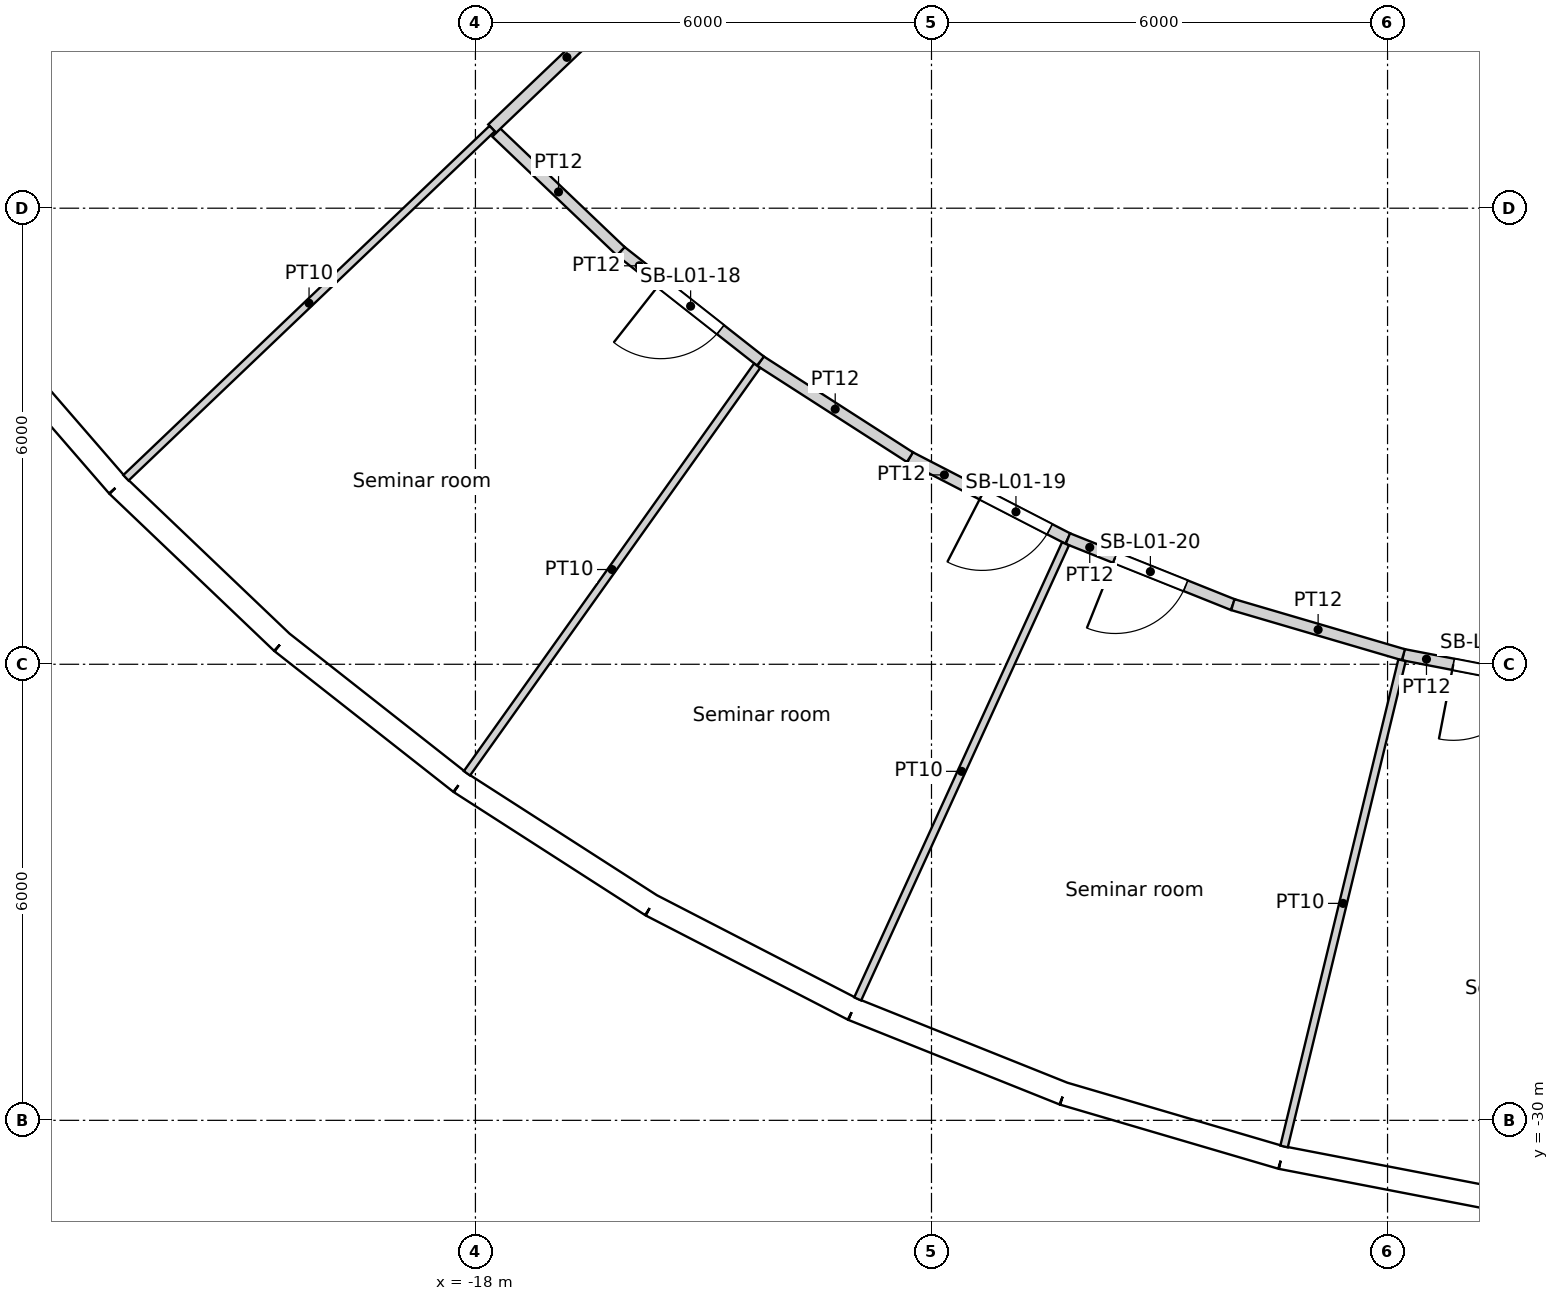
"""IFC4 building model, lengths in metres.
Left out: names, types, materials, properties, quantities, classifications, styles, units other than length and angle.
Written with IfcOpenShell. Run it as: python <this file> out.ifc"""

import sys

from ifc_helpers import new_model, si_unit, direction, frame, frame_2d, origin, origin_2d, place, context, subcontext, project, spatial, rectangle, circle, extrude, element, fill, save


model = new_model("IFC4")
c1 = context("Model", 3, precision=1e-05, world=origin(), true_north=direction((0.0, 1.0)))
c2 = subcontext(c1, "Body", "Model", "MODEL_VIEW")
j1 = project(units=[si_unit("LENGTHUNIT", "METRE"), si_unit("PLANEANGLEUNIT", "RADIAN")], contexts=[c1])
p1 = place(None, origin())
s1 = spatial("IfcSite", under=j1, at=p1, CompositionType="ELEMENT")
p2 = place(p1, origin())
s2 = spatial("IfcBuilding", under=s1, at=p2, CompositionType="ELEMENT")
p3 = place(p2, frame((0.0, 0.0, 9.0)))
s3 = spatial("IfcBuildingStorey", under=s2, at=p3, CompositionType="ELEMENT", Elevation=9.0)
for number, where, z_axis, x_axis in (
    (1, (-23.797, -18.715, 0.0), (0.0, 0.0, 1.0), (1.0, 0.0, 0.0)),
    (2, (-19.826, -22.88, 0.0), (0.0, 0.0, 1.0), (1.0, 0.0, 0.0)),
    (3, (-15.137, -26.219, 0.0), (0.0, 0.0, 1.0), (1.0, 0.0, 0.0)),
    (4, (-9.902, -28.61, 0.0), (0.0, 0.0, 1.0), (1.0, 0.0, 0.0)),
    (5, (-4.309, -29.966, 0.0), (0.0, 0.0, 1.0), (1.0, 0.0, 0.0)),
):
    element("IfcColumn", number, at=place(p3, frame(where, z_axis=z_axis, x_axis=x_axis)), inside=s3, PredefinedType="COLUMN", context=c2, shape_type="SweptSolid", body=[
        extrude(circle(Radius=0.7, at=origin_2d()), origin(), (0.0, 0.0, 1.0), 4.8),
    ])
for number, where, z_axis, x_axis in (
    (6, (-16.846, -17.855, 0.0), (0.0, 0.0, 1.0), (1.0, 0.0, 0.0)),
    (7, (-12.274, -21.259, 0.0), (0.0, 0.0, 1.0), (1.0, 0.0, 0.0)),
    (8, (-7.04, -23.516, 0.0), (0.0, 0.0, 1.0), (1.0, 0.0, 0.0)),
):
    element("IfcColumn", number, at=place(p3, frame(where, z_axis=z_axis, x_axis=x_axis)), inside=s3, PredefinedType="COLUMN", context=c2, shape_type="SweptSolid", body=[
        extrude(circle(Radius=0.75, at=origin_2d()), origin(), (0.0, 0.0, 1.0), 4.8),
    ])
for number, where, z_axis, x_axis in (
    (9, (-9.411, -16.301, 0.0), (0.0, 0.0, 1.0), (1.0, 0.0, 0.0)),
    (10, (-4.188, -18.35, 0.0), (0.0, 0.0, 1.0), (1.0, 0.0, 0.0)),
):
    element("IfcColumn", number, at=place(p3, frame(where, z_axis=z_axis, x_axis=x_axis)), inside=s3, PredefinedType="COLUMN", context=c2, shape_type="SweptSolid", body=[
        extrude(circle(Radius=0.8, at=origin_2d()), origin(), (0.0, 0.0, 1.0), 4.8),
    ])
p4 = place(p3, frame((-24.662, -19.394, 0.0), z_axis=(0.0, 0.0, 1.0), x_axis=(0.654809121128, -0.755794294029, 0.0)))
e11 = element("IfcWall", 11, at=p4, inside=s3, PredefinedType="SOLIDWALL", context=c2, shape_type="SweptSolid", body=[
    extrude(rectangle(XDim=2.986, YDim=0.3, at=frame_2d((1.493, 0.0))), origin(), (0.0, 0.0, 1.0), 4.35),
])
p5 = place(p4, frame((1.493, 0.0, 2.0)))
e12 = element("IfcOpeningElement", 12, at=p5, cuts=e11, PredefinedType="OPENING", context=c2, shape_type="SweptSolid", body=[
    extrude(circle(Radius=1.2, at=origin_2d()), frame((0.0, 0.16, 0.0), z_axis=(0.0, -1.0, 0.0), x_axis=(1.0, 0.0, 0.0)), (0.0, 0.0, 1.0), 0.32),
])
p6 = place(p3, frame((-22.707, -21.651, 0.0), z_axis=(0.0, 0.0, 1.0), x_axis=(0.723750841228, -0.690061388444, 0.0)))
e13 = element("IfcWall", 13, at=p6, inside=s3, PredefinedType="SOLIDWALL", context=c2, shape_type="SweptSolid", body=[
    extrude(rectangle(XDim=2.986, YDim=0.3, at=frame_2d((1.493, 0.0))), origin(), (0.0, 0.0, 1.0), 4.35),
])
p7 = place(p6, frame((1.493, 0.0, 2.0)))
e14 = element("IfcOpeningElement", 14, at=p7, cuts=e13, PredefinedType="OPENING", context=c2, shape_type="SweptSolid", body=[
    extrude(circle(Radius=1.2, at=origin_2d()), frame((0.0, 0.16, 0.0), z_axis=(0.0, -1.0, 0.0), x_axis=(1.0, 0.0, 0.0)), (0.0, 0.0, 1.0), 0.32),
])
p8 = place(p3, frame((-20.546, -23.711, 0.0), z_axis=(0.0, 0.0, 1.0), x_axis=(0.786043032847, -0.618171780747, 0.0)))
e15 = element("IfcWall", 15, at=p8, inside=s3, PredefinedType="SOLIDWALL", context=c2, shape_type="SweptSolid", body=[
    extrude(rectangle(XDim=2.986, YDim=0.3, at=frame_2d((1.493, 0.0))), origin(), (0.0, 0.0, 1.0), 4.35),
])
p9 = place(p8, frame((1.493, 0.0, 2.0)))
e16 = element("IfcOpeningElement", 16, at=p9, cuts=e15, PredefinedType="OPENING", context=c2, shape_type="SweptSolid", body=[
    extrude(circle(Radius=1.2, at=origin_2d()), frame((0.0, 0.16, 0.0), z_axis=(0.0, -1.0, 0.0), x_axis=(1.0, 0.0, 0.0)), (0.0, 0.0, 1.0), 0.32),
])
p10 = place(p3, frame((-18.199, -25.557, 0.0), z_axis=(0.0, 0.0, 1.0), x_axis=(0.841242231846, -0.540658401727, 0.0)))
e17 = element("IfcWall", 17, at=p10, inside=s3, PredefinedType="SOLIDWALL", context=c2, shape_type="SweptSolid", body=[
    extrude(rectangle(XDim=2.986, YDim=0.3, at=frame_2d((1.493, 0.0))), origin(), (0.0, 0.0, 1.0), 4.35),
])
p11 = place(p10, frame((1.493, 0.0, 2.0)))
e18 = element("IfcOpeningElement", 18, at=p11, cuts=e17, PredefinedType="OPENING", context=c2, shape_type="SweptSolid", body=[
    extrude(circle(Radius=1.2, at=origin_2d()), frame((0.0, 0.16, 0.0), z_axis=(0.0, -1.0, 0.0), x_axis=(1.0, 0.0, 0.0)), (0.0, 0.0, 1.0), 0.32),
])
p12 = place(p3, frame((-15.687, -27.171, 0.0), z_axis=(0.0, 0.0, 1.0), x_axis=(0.888831268481, -0.458234630043, 0.0)))
e19 = element("IfcWall", 19, at=p12, inside=s3, PredefinedType="SOLIDWALL", context=c2, shape_type="SweptSolid", body=[
    extrude(rectangle(XDim=2.986, YDim=0.3, at=frame_2d((1.493, 0.0))), origin(), (0.0, 0.0, 1.0), 4.35),
])
p13 = place(p12, frame((1.493, 0.0, 2.0)))
e20 = element("IfcOpeningElement", 20, at=p13, cuts=e19, PredefinedType="OPENING", context=c2, shape_type="SweptSolid", body=[
    extrude(circle(Radius=1.2, at=origin_2d()), frame((0.0, 0.16, 0.0), z_axis=(0.0, -1.0, 0.0), x_axis=(1.0, 0.0, 0.0)), (0.0, 0.0, 1.0), 0.32),
])
p14 = place(p3, frame((-13.033, -28.539, 0.0), z_axis=(0.0, 0.0, 1.0), x_axis=(0.928380795373, -0.371630325434, 0.0)))
e21 = element("IfcWall", 21, at=p14, inside=s3, PredefinedType="SOLIDWALL", context=c2, shape_type="SweptSolid", body=[
    extrude(rectangle(XDim=2.986, YDim=0.3, at=frame_2d((1.493, 0.0))), origin(), (0.0, 0.0, 1.0), 4.35),
])
p15 = place(p14, frame((1.493, 0.0, 2.0)))
e22 = element("IfcOpeningElement", 22, at=p15, cuts=e21, PredefinedType="OPENING", context=c2, shape_type="SweptSolid", body=[
    extrude(circle(Radius=1.2, at=origin_2d()), frame((0.0, 0.16, 0.0), z_axis=(0.0, -1.0, 0.0), x_axis=(1.0, 0.0, 0.0)), (0.0, 0.0, 1.0), 0.32),
])
p16 = place(p3, frame((-10.261, -29.649, 0.0), z_axis=(0.0, 0.0, 1.0), x_axis=(0.959502108153, -0.281701445593, 0.0)))
e23 = element("IfcWall", 23, at=p16, inside=s3, PredefinedType="SOLIDWALL", context=c2, shape_type="SweptSolid", body=[
    extrude(rectangle(XDim=2.986, YDim=0.3, at=frame_2d((1.493, 0.0))), origin(), (0.0, 0.0, 1.0), 4.35),
])
p17 = place(p16, frame((1.493, 0.0, 2.0)))
e24 = element("IfcOpeningElement", 24, at=p17, cuts=e23, PredefinedType="OPENING", context=c2, shape_type="SweptSolid", body=[
    extrude(circle(Radius=1.2, at=origin_2d()), frame((0.0, 0.16, 0.0), z_axis=(0.0, -1.0, 0.0), x_axis=(1.0, 0.0, 0.0)), (0.0, 0.0, 1.0), 0.32),
])
p18 = place(p3, frame((-7.397, -30.49, 0.0), z_axis=(0.0, 0.0, 1.0), x_axis=(0.981918853666, -0.189302310646, 0.0)))
e25 = element("IfcWall", 25, at=p18, inside=s3, PredefinedType="SOLIDWALL", context=c2, shape_type="SweptSolid", body=[
    extrude(rectangle(XDim=2.986, YDim=0.3, at=frame_2d((1.493, 0.0))), origin(), (0.0, 0.0, 1.0), 4.35),
])
p19 = place(p18, frame((1.493, 0.0, 2.0)))
e26 = element("IfcOpeningElement", 26, at=p19, cuts=e25, PredefinedType="OPENING", context=c2, shape_type="SweptSolid", body=[
    extrude(circle(Radius=1.2, at=origin_2d()), frame((0.0, 0.16, 0.0), z_axis=(0.0, -1.0, 0.0), x_axis=(1.0, 0.0, 0.0)), (0.0, 0.0, 1.0), 0.32),
])
p20 = place(p3, frame((-22.598, -21.547, 0.0), z_axis=(0.0, 0.0, 1.0), x_axis=(0.723738396813, 0.690074440172, 0.0)))
e27 = element("IfcWall", 27, at=p20, inside=s3, PredefinedType="PARTITIONING", context=c2, shape_type="SweptSolid", body=[
    extrude(rectangle(XDim=6.658, YDim=0.1, at=frame_2d((3.329, 0.0))), origin(), (0.0, 0.0, 1.0), 3.75),
])
p21 = place(p3, frame((-18.112, -25.435, 0.0), z_axis=(0.0, 0.0, 1.0), x_axis=(0.580055201519, 0.814577168346, 0.0)))
e28 = element("IfcWall", 28, at=p21, inside=s3, PredefinedType="PARTITIONING", context=c2, shape_type="SweptSolid", body=[
    extrude(rectangle(XDim=6.582, YDim=0.1, at=frame_2d((3.291, 0.0))), origin(), (0.0, 0.0, 1.0), 3.75),
])
p22 = place(p3, frame((-17.726, -17.005, 0.0), z_axis=(0.0, 0.0, 1.0), x_axis=(0.723737544967, -0.690075333573, 0.0)))
e29 = element("IfcWall", 29, at=p22, inside=s3, PredefinedType="PARTITIONING", context=c2, shape_type="SweptSolid", body=[
    extrude(rectangle(XDim=2.263, YDim=0.15, at=frame_2d((1.131, 0.0))), origin(), (0.0, 0.0, 1.0), 3.75),
])
p23 = place(p3, frame((-17.78, -16.953, 0.0), z_axis=(0.0, 0.0, 1.0), x_axis=(0.723749021552, 0.690063296954, 0.0)))
e30 = element("IfcWall", 30, at=p23, inside=s3, PredefinedType="PARTITIONING", context=c2, shape_type="SweptSolid", body=[
    extrude(rectangle(XDim=2.718, YDim=0.15, at=frame_2d((1.359, 0.0))), origin(), (0.0, 0.0, 1.0), 3.75),
])
p24 = place(p3, frame((-14.25, -20.011, 0.0), z_axis=(0.0, 0.0, 1.0), x_axis=(-0.786108126536, 0.618089001191, 0.0)))
e31 = element("IfcWall", 31, at=p24, inside=s3, PredefinedType="PARTITIONING", context=c2, shape_type="SweptSolid", body=[
    extrude(rectangle(XDim=2.338, YDim=0.15, at=frame_2d((1.169, 0.0))), origin(), (0.0, 0.0, 1.0), 3.75),
])
p25 = place(p24, frame((0.669, 0.0, 0.0)))
e32 = element("IfcOpeningElement", 32, at=p25, cuts=e31, PredefinedType="OPENING", context=c2, shape_type="SweptSolid", body=[
    extrude(rectangle(XDim=1.0, YDim=2.1, at=frame_2d((0.5, 1.05))), frame((0.0, 0.075, 0.0), z_axis=(0.0, -1.0, 0.0), x_axis=(1.0, 0.0, 0.0)), (0.0, 0.0, 1.0), 0.15),
])
p26 = place(p3, frame((-14.25, -20.011, 0.0), z_axis=(0.0, 0.0, 1.0), x_axis=(0.841236155743, -0.540667855777, 0.0)))
e33 = element("IfcWall", 33, at=p26, inside=s3, PredefinedType="PARTITIONING", context=c2, shape_type="SweptSolid", body=[
    extrude(rectangle(XDim=2.338, YDim=0.15, at=frame_2d((1.169, 0.0))), origin(), (0.0, 0.0, 1.0), 3.75),
])
p27 = place(p3, frame((-12.971, -28.403, 0.0), z_axis=(0.0, 0.0, 1.0), x_axis=(0.415409113983, 0.909634689323, 0.0)))
e34 = element("IfcWall", 34, at=p27, inside=s3, PredefinedType="PARTITIONING", context=c2, shape_type="SweptSolid", body=[
    extrude(rectangle(XDim=6.582, YDim=0.1, at=frame_2d((3.291, 0.0))), origin(), (0.0, 0.0, 1.0), 3.75),
])
p28 = place(p3, frame((-10.205, -22.347, 0.0), z_axis=(0.0, 0.0, 1.0), x_axis=(-0.888845697941, 0.458206640339, 0.0)))
e35 = element("IfcWall", 35, at=p28, inside=s3, PredefinedType="PARTITIONING", context=c2, shape_type="SweptSolid", body=[
    extrude(rectangle(XDim=2.338, YDim=0.15, at=frame_2d((1.169, 0.0))), origin(), (0.0, 0.0, 1.0), 3.75),
])
p29 = place(p28, frame((0.269, 0.0, 0.0)))
e36 = element("IfcOpeningElement", 36, at=p29, cuts=e35, PredefinedType="OPENING", context=c2, shape_type="SweptSolid", body=[
    extrude(rectangle(XDim=1.0, YDim=2.1, at=frame_2d((0.5, 1.05))), frame((0.0, 0.075, 0.0), z_axis=(0.0, -1.0, 0.0), x_axis=(1.0, 0.0, 0.0)), (0.0, 0.0, 1.0), 0.15),
])
p30 = place(p3, frame((-8.035, -23.216, 0.0), z_axis=(0.0, 0.0, 1.0), x_axis=(-0.92836862221, 0.371660734133, 0.0)))
e37 = element("IfcWall", 37, at=p30, inside=s3, PredefinedType="PARTITIONING", context=c2, shape_type="SweptSolid", body=[
    extrude(rectangle(XDim=2.338, YDim=0.15, at=frame_2d((1.169, 0.0))), origin(), (0.0, 0.0, 1.0), 3.75),
])
p31 = place(p30, frame((0.669, 0.0, 0.0)))
e38 = element("IfcOpeningElement", 38, at=p31, cuts=e37, PredefinedType="OPENING", context=c2, shape_type="SweptSolid", body=[
    extrude(rectangle(XDim=1.0, YDim=2.1, at=frame_2d((0.5, 1.05))), frame((0.0, 0.075, 0.0), z_axis=(0.0, -1.0, 0.0), x_axis=(1.0, 0.0, 0.0)), (0.0, 0.0, 1.0), 0.15),
])
p32 = place(p3, frame((-8.035, -23.216, 0.0), z_axis=(0.0, 0.0, 1.0), x_axis=(0.959488462959, -0.28174791827, 0.0)))
e39 = element("IfcWall", 39, at=p32, inside=s3, PredefinedType="PARTITIONING", context=c2, shape_type="SweptSolid", body=[
    extrude(rectangle(XDim=2.338, YDim=0.15, at=frame_2d((1.169, 0.0))), origin(), (0.0, 0.0, 1.0), 3.75),
])
p33 = place(p3, frame((-7.361, -30.344, 0.0), z_axis=(0.0, 0.0, 1.0), x_axis=(0.235748643115, 0.971814065174, 0.0)))
e40 = element("IfcWall", 40, at=p33, inside=s3, PredefinedType="PARTITIONING", context=c2, shape_type="SweptSolid", body=[
    extrude(rectangle(XDim=6.582, YDim=0.1, at=frame_2d((3.291, 0.0))), origin(), (0.0, 0.0, 1.0), 3.75),
])
p34 = place(p3, frame((-3.496, -24.317, 0.0), z_axis=(0.0, 0.0, 1.0), x_axis=(-0.981934124814, 0.189223081374, 0.0)))
e41 = element("IfcWall", 41, at=p34, inside=s3, PredefinedType="PARTITIONING", context=c2, shape_type="SweptSolid", body=[
    extrude(rectangle(XDim=2.338, YDim=0.15, at=frame_2d((1.169, 0.0))), origin(), (0.0, 0.0, 1.0), 3.75),
])
p35 = place(p34, frame((0.669, 0.0, 0.0)))
e42 = element("IfcOpeningElement", 42, at=p35, cuts=e41, PredefinedType="OPENING", context=c2, shape_type="SweptSolid", body=[
    extrude(rectangle(XDim=1.0, YDim=2.1, at=frame_2d((0.5, 1.05))), frame((0.0, 0.075, 0.0), z_axis=(0.0, -1.0, 0.0), x_axis=(1.0, 0.0, 0.0)), (0.0, 0.0, 1.0), 0.15),
])
p36 = place(p5, origin())
e43 = element("IfcWindow", 43, at=p36, inside=s3, PartitioningType="SINGLE_PANEL", PredefinedType="WINDOW", context=c2, shape_type="SweptSolid", body=[
    extrude(circle(Radius=1.2, at=origin_2d()), frame((0.0, 0.12, 0.0), z_axis=(0.0, -1.0, 0.0), x_axis=(1.0, 0.0, 0.0)), (0.0, 0.0, 1.0), 0.1),
])
fill(e12, e43)
p37 = place(p7, origin())
e44 = element("IfcWindow", 44, at=p37, inside=s3, PartitioningType="SINGLE_PANEL", PredefinedType="WINDOW", context=c2, shape_type="SweptSolid", body=[
    extrude(circle(Radius=1.2, at=origin_2d()), frame((0.0, 0.12, 0.0), z_axis=(0.0, -1.0, 0.0), x_axis=(1.0, 0.0, 0.0)), (0.0, 0.0, 1.0), 0.1),
])
fill(e14, e44)
p38 = place(p9, origin())
e45 = element("IfcWindow", 45, at=p38, inside=s3, PartitioningType="SINGLE_PANEL", PredefinedType="WINDOW", context=c2, shape_type="SweptSolid", body=[
    extrude(circle(Radius=1.2, at=origin_2d()), frame((0.0, 0.12, 0.0), z_axis=(0.0, -1.0, 0.0), x_axis=(1.0, 0.0, 0.0)), (0.0, 0.0, 1.0), 0.1),
])
fill(e16, e45)
p39 = place(p11, origin())
e46 = element("IfcWindow", 46, at=p39, inside=s3, PartitioningType="SINGLE_PANEL", PredefinedType="WINDOW", context=c2, shape_type="SweptSolid", body=[
    extrude(circle(Radius=1.2, at=origin_2d()), frame((0.0, 0.12, 0.0), z_axis=(0.0, -1.0, 0.0), x_axis=(1.0, 0.0, 0.0)), (0.0, 0.0, 1.0), 0.1),
])
fill(e18, e46)
p40 = place(p13, origin())
e47 = element("IfcWindow", 47, at=p40, inside=s3, PartitioningType="SINGLE_PANEL", PredefinedType="WINDOW", context=c2, shape_type="SweptSolid", body=[
    extrude(circle(Radius=1.2, at=origin_2d()), frame((0.0, 0.12, 0.0), z_axis=(0.0, -1.0, 0.0), x_axis=(1.0, 0.0, 0.0)), (0.0, 0.0, 1.0), 0.1),
])
fill(e20, e47)
p41 = place(p15, origin())
e48 = element("IfcWindow", 48, at=p41, inside=s3, PartitioningType="SINGLE_PANEL", PredefinedType="WINDOW", context=c2, shape_type="SweptSolid", body=[
    extrude(circle(Radius=1.2, at=origin_2d()), frame((0.0, 0.12, 0.0), z_axis=(0.0, -1.0, 0.0), x_axis=(1.0, 0.0, 0.0)), (0.0, 0.0, 1.0), 0.1),
])
fill(e22, e48)
p42 = place(p17, origin())
e49 = element("IfcWindow", 49, at=p42, inside=s3, PartitioningType="SINGLE_PANEL", PredefinedType="WINDOW", context=c2, shape_type="SweptSolid", body=[
    extrude(circle(Radius=1.2, at=origin_2d()), frame((0.0, 0.12, 0.0), z_axis=(0.0, -1.0, 0.0), x_axis=(1.0, 0.0, 0.0)), (0.0, 0.0, 1.0), 0.1),
])
fill(e24, e49)
p43 = place(p19, origin())
e50 = element("IfcWindow", 50, at=p43, inside=s3, PartitioningType="SINGLE_PANEL", PredefinedType="WINDOW", context=c2, shape_type="SweptSolid", body=[
    extrude(circle(Radius=1.2, at=origin_2d()), frame((0.0, 0.12, 0.0), z_axis=(0.0, -1.0, 0.0), x_axis=(1.0, 0.0, 0.0)), (0.0, 0.0, 1.0), 0.1),
])
fill(e26, e50)
p44 = place(p25, origin())
e51 = element("IfcDoor", 51, at=p44, inside=s3, OperationType="SINGLE_SWING_RIGHT", PredefinedType="DOOR", context=c2, shape_type="SweptSolid", body=[
    extrude(rectangle(XDim=1.0, YDim=2.1, at=frame_2d((0.5, 1.05))), frame((0.0, 0.025, 0.0), z_axis=(0.0, -1.0, 0.0), x_axis=(1.0, 0.0, 0.0)), (0.0, 0.0, 1.0), 0.05),
])
fill(e32, e51)
p45 = place(p29, origin())
e52 = element("IfcDoor", 52, at=p45, inside=s3, OperationType="SINGLE_SWING_RIGHT", PredefinedType="DOOR", context=c2, shape_type="SweptSolid", body=[
    extrude(rectangle(XDim=1.0, YDim=2.1, at=frame_2d((0.5, 1.05))), frame((0.0, 0.025, 0.0), z_axis=(0.0, -1.0, 0.0), x_axis=(1.0, 0.0, 0.0)), (0.0, 0.0, 1.0), 0.05),
])
fill(e36, e52)
p46 = place(p31, origin())
e53 = element("IfcDoor", 53, at=p46, inside=s3, OperationType="SINGLE_SWING_RIGHT", PredefinedType="DOOR", context=c2, shape_type="SweptSolid", body=[
    extrude(rectangle(XDim=1.0, YDim=2.1, at=frame_2d((0.5, 1.05))), frame((0.0, 0.025, 0.0), z_axis=(0.0, -1.0, 0.0), x_axis=(1.0, 0.0, 0.0)), (0.0, 0.0, 1.0), 0.05),
])
fill(e38, e53)
p47 = place(p35, origin())
e54 = element("IfcDoor", 54, at=p47, inside=s3, OperationType="SINGLE_SWING_RIGHT", PredefinedType="DOOR", context=c2, shape_type="SweptSolid", body=[
    extrude(rectangle(XDim=1.0, YDim=2.1, at=frame_2d((0.5, 1.05))), frame((0.0, 0.025, 0.0), z_axis=(0.0, -1.0, 0.0), x_axis=(1.0, 0.0, 0.0)), (0.0, 0.0, 1.0), 0.05),
])
fill(e42, e54)
save(model, sys.argv[1])
